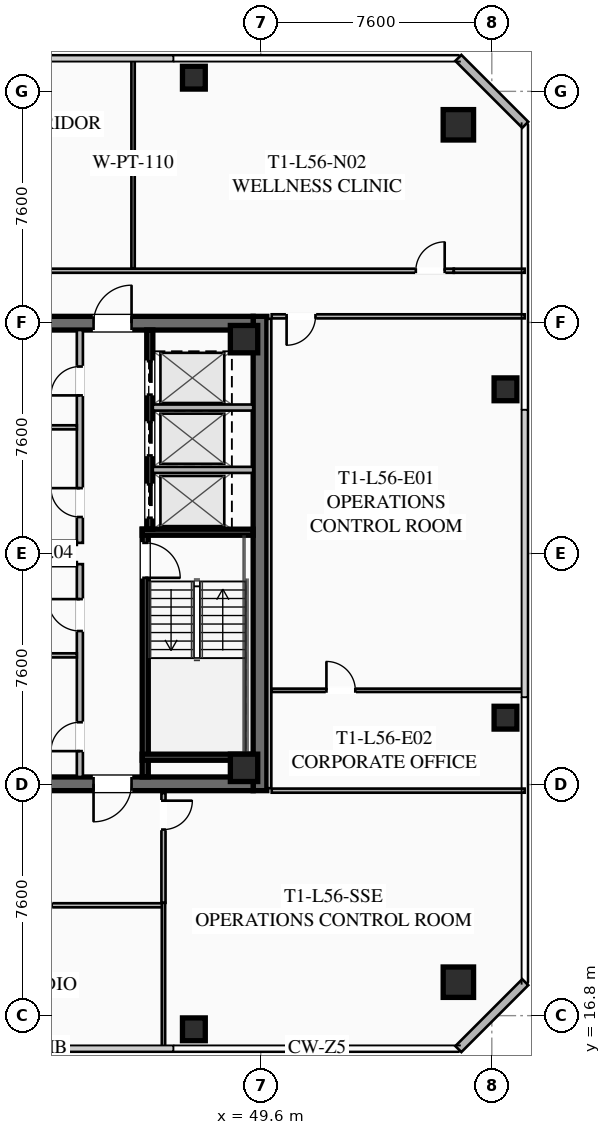
"""IFC4 building model, lengths in metres.
Left out: names, types, materials, properties, quantities, classifications, styles, units other than length and angle.
Written with IfcOpenShell. Run it as: python <this file> out.ifc"""

import sys

from ifc_helpers import new_model, si_unit, direction, frame, frame_2d, origin, origin_2d, place, context, subcontext, project, spatial, rectangle, hollow_rectangle, extrude, element, fill, save


model = new_model("IFC4")
c1 = context("Model", 3, precision=1e-05, world=origin(), true_north=direction((0.0, 1.0)))
c2 = subcontext(c1, "Body", "Model", "MODEL_VIEW")
j1 = project(units=[si_unit("LENGTHUNIT", "METRE"), si_unit("PLANEANGLEUNIT", "RADIAN")], contexts=[c1])
p1 = place(None, origin())
s1 = spatial("IfcSite", under=j1, at=p1, CompositionType="ELEMENT")
p2 = place(p1, origin())
s2 = spatial("IfcBuilding", under=s1, at=p2, CompositionType="ELEMENT")
p3 = place(p2, frame((0.0, 0.0, 207.75)))
s3 = spatial("IfcBuildingStorey", under=s2, at=p3, CompositionType="ELEMENT", Elevation=207.75)
p4 = place(p3, frame((49.575, 39.8, 0.0), z_axis=(0.0, 0.0, 1.0), x_axis=(0.0, -1.0, 0.0)))
e1 = element("IfcWall", 1, at=p4, inside=s3, PredefinedType="SHEAR", context=c2, shape_type="SweptSolid", body=[
    extrude(rectangle(XDim=15.6, YDim=0.45, at=frame_2d((7.8, 0.0))), origin(), (0.0, 0.0, 1.0), 3.55),
])
p5 = place(p3, frame((49.35, 24.425, 0.0), z_axis=(0.0, 0.0, 1.0), x_axis=(-1.0, 0.0, 0.0)))
e2 = element("IfcWall", 2, at=p5, inside=s3, PredefinedType="SHEAR", context=c2, shape_type="SweptSolid", body=[
    extrude(rectangle(XDim=14.7, YDim=0.45, at=frame_2d((7.35, 0.0))), origin(), (0.0, 0.0, 1.0), 3.55),
])
p6 = place(p5, frame((9.05, 0.0, 0.0)))
e3 = element("IfcOpeningElement", 3, at=p6, cuts=e2, PredefinedType="OPENING", context=c2, shape_type="SweptSolid", body=[
    extrude(rectangle(XDim=1.25, YDim=2.25, at=frame_2d((0.625, 1.125))), frame((0.0, 0.235, 0.0), z_axis=(0.0, -1.0, 0.0), x_axis=(1.0, 0.0, 0.0)), (0.0, 0.0, 1.0), 0.47),
])
p7 = place(p5, frame((4.0, 0.0, 0.0)))
e4 = element("IfcOpeningElement", 4, at=p7, cuts=e2, PredefinedType="OPENING", context=c2, shape_type="SweptSolid", body=[
    extrude(rectangle(XDim=1.25, YDim=2.25, at=frame_2d((0.625, 1.125))), frame((0.0, 0.235, 0.0), z_axis=(0.0, -1.0, 0.0), x_axis=(1.0, 0.0, 0.0)), (0.0, 0.0, 1.0), 0.47),
])
p8 = place(p3, frame((34.65, 39.575, 0.0), z_axis=(0.0, 0.0, 1.0), x_axis=(1.0, 0.0, 0.0)))
e5 = element("IfcWall", 5, at=p8, inside=s3, PredefinedType="SHEAR", context=c2, shape_type="SweptSolid", body=[
    extrude(rectangle(XDim=14.7, YDim=0.45, at=frame_2d((7.35, 0.0))), origin(), (0.0, 0.0, 1.0), 3.55),
])
p9 = place(p8, frame((4.4, 0.0, 0.0)))
e6 = element("IfcOpeningElement", 6, at=p9, cuts=e5, PredefinedType="OPENING", context=c2, shape_type="SweptSolid", body=[
    extrude(rectangle(XDim=1.25, YDim=2.25, at=frame_2d((0.625, 1.125))), frame((0.0, 0.235, 0.0), z_axis=(0.0, -1.0, 0.0), x_axis=(1.0, 0.0, 0.0)), (0.0, 0.0, 1.0), 0.47),
])
p10 = place(p8, frame((9.45, 0.0, 0.0)))
e7 = element("IfcOpeningElement", 7, at=p10, cuts=e5, PredefinedType="OPENING", context=c2, shape_type="SweptSolid", body=[
    extrude(rectangle(XDim=1.25, YDim=2.25, at=frame_2d((0.625, 1.125))), frame((0.0, 0.235, 0.0), z_axis=(0.0, -1.0, 0.0), x_axis=(1.0, 0.0, 0.0)), (0.0, 0.0, 1.0), 0.47),
])
for number, where, z_axis, x_axis in (
    (8, (49.05, 24.95, 0.0), (0.0, 0.0, 1.0), (1.0, 0.0, 0.0)),
    (9, (49.05, 39.05, 0.0), (0.0, 0.0, 1.0), (1.0, 0.0, 0.0)),
):
    element("IfcColumn", number, at=place(p3, frame(where, z_axis=z_axis, x_axis=x_axis)), inside=s3, PredefinedType="COLUMN", context=c2, shape_type="SweptSolid", body=[
        extrude(hollow_rectangle(XDim=0.9, YDim=0.9, WallThickness=0.04, at=origin_2d()), origin(), (0.0, 0.0, 1.0), 3.37),
    ])
for number, where, z_axis, x_axis in (
    (10, (56.1, 17.9, 0.0), (0.0, 0.0, 1.0), (1.0, 0.0, 0.0)),
    (11, (56.1, 46.1, 0.0), (0.0, 0.0, 1.0), (1.0, 0.0, 0.0)),
):
    element("IfcColumn", number, at=place(p3, frame(where, z_axis=z_axis, x_axis=x_axis)), inside=s3, PredefinedType="COLUMN", context=c2, shape_type="SweptSolid", body=[
        extrude(hollow_rectangle(XDim=1.0, YDim=1.0, WallThickness=0.04, at=origin_2d()), origin(), (0.0, 0.0, 1.0), 3.37),
    ])
for number, where, z_axis, x_axis in (
    (12, (47.4, 16.35, 0.0), (0.0, 0.0, 1.0), (1.0, 0.0, 0.0)),
    (13, (57.65, 26.6, 0.0), (0.0, 0.0, 1.0), (1.0, 0.0, 0.0)),
    (14, (57.65, 37.4, 0.0), (0.0, 0.0, 1.0), (1.0, 0.0, 0.0)),
    (15, (47.4, 47.65, 0.0), (0.0, 0.0, 1.0), (1.0, 0.0, 0.0)),
):
    element("IfcColumn", number, at=place(p3, frame(where, z_axis=z_axis, x_axis=x_axis)), inside=s3, PredefinedType="COLUMN", context=c2, shape_type="SweptSolid", body=[
        extrude(hollow_rectangle(XDim=0.75, YDim=0.75, WallThickness=0.032, at=origin_2d()), origin(), (0.0, 0.0, 1.0), 3.37),
    ])
for number, where, z_axis, x_axis in (
    (16, (56.1, 48.3, 0.0), (0.0, 0.0, 1.0), (0.707, -0.707, 0.0)),
    (17, (58.3, 17.9, 0.0), (0.0, 0.0, 1.0), (-0.707, -0.707, 0.0)),
):
    element("IfcWall", number, at=place(p3, frame(where, z_axis=z_axis, x_axis=x_axis)), inside=s3, PredefinedType="SOLIDWALL", context=c2, shape_type="SweptSolid", body=[
        extrude(rectangle(XDim=3.111, YDim=0.28, at=frame_2d((1.556, 0.0))), origin(), (0.0, 0.0, 1.0), 3.37),
    ])
p11 = place(p3, frame((45.8, 32.8, 0.0), z_axis=(0.0, 0.0, 1.0), x_axis=(0.0, -1.0, 0.0)))
e18 = element("IfcWall", 18, at=p11, inside=s3, PredefinedType="SHEAR", context=c2, shape_type="SweptSolid", body=[
    extrude(rectangle(XDim=8.15, YDim=0.2, at=frame_2d((4.075, 0.0))), origin(), (0.0, 0.0, 1.0), 3.37),
])
p12 = place(p11, frame((0.45, 0.0, 0.0)))
e19 = element("IfcOpeningElement", 19, at=p12, cuts=e18, PredefinedType="OPENING", context=c2, shape_type="SweptSolid", body=[
    extrude(rectangle(XDim=1.15, YDim=2.2, at=frame_2d((0.575, 1.1))), frame((0.0, 0.11, 0.0), z_axis=(0.0, -1.0, 0.0), x_axis=(1.0, 0.0, 0.0)), (0.0, 0.0, 1.0), 0.22),
])
for number, where, z_axis, x_axis in (
    (20, (45.7, 32.7, 0.0), (0.0, 0.0, 1.0), (1.0, 0.0, 0.0)),
    (21, (45.7, 25.3, 0.0), (0.0, 0.0, 1.0), (1.0, 0.0, 0.0)),
):
    element("IfcWall", number, at=place(p3, frame(where, z_axis=z_axis, x_axis=x_axis)), inside=s3, PredefinedType="SHEAR", context=c2, shape_type="SweptSolid", body=[
        extrude(rectangle(XDim=3.65, YDim=0.2, at=frame_2d((1.825, 0.0))), origin(), (0.0, 0.0, 1.0), 3.37),
    ])
p13 = place(p3, frame((45.95, 39.35, 0.0), z_axis=(0.0, 0.0, 1.0), x_axis=(0.0, -1.0, 0.0)))
e22 = element("IfcWall", 22, at=p13, inside=s3, PredefinedType="SHEAR", context=c2, shape_type="SweptSolid", body=[
    extrude(rectangle(XDim=6.55, YDim=0.2, at=frame_2d((3.275, 0.0))), origin(), (0.0, 0.0, 1.0), 3.37),
])
p14 = place(p13, frame((5.075, 0.0, 0.0)))
e23 = element("IfcOpeningElement", 23, at=p14, cuts=e22, PredefinedType="OPENING", context=c2, shape_type="SweptSolid", body=[
    extrude(rectangle(XDim=1.1, YDim=2.2, at=frame_2d((0.55, 1.1))), frame((0.0, 0.11, 0.0), z_axis=(0.0, -1.0, 0.0), x_axis=(1.0, 0.0, 0.0)), (0.0, 0.0, 1.0), 0.22),
])
p15 = place(p13, frame((3.025, 0.0, 0.0)))
e24 = element("IfcOpeningElement", 24, at=p15, cuts=e22, PredefinedType="OPENING", context=c2, shape_type="SweptSolid", body=[
    extrude(rectangle(XDim=1.1, YDim=2.2, at=frame_2d((0.55, 1.1))), frame((0.0, 0.11, 0.0), z_axis=(0.0, -1.0, 0.0), x_axis=(1.0, 0.0, 0.0)), (0.0, 0.0, 1.0), 0.22),
])
p16 = place(p13, frame((1.025, 0.0, 0.0)))
e25 = element("IfcOpeningElement", 25, at=p16, cuts=e22, PredefinedType="OPENING", context=c2, shape_type="SweptSolid", body=[
    extrude(rectangle(XDim=1.1, YDim=2.2, at=frame_2d((0.55, 1.1))), frame((0.0, 0.11, 0.0), z_axis=(0.0, -1.0, 0.0), x_axis=(1.0, 0.0, 0.0)), (0.0, 0.0, 1.0), 0.22),
])
for number, where, z_axis, x_axis in (
    (26, (46.05, 34.75, 0.0), (0.0, 0.0, 1.0), (1.0, 0.0, 0.0)),
    (27, (46.05, 36.8, 0.0), (0.0, 0.0, 1.0), (1.0, 0.0, 0.0)),
):
    element("IfcWall", number, at=place(p3, frame(where, z_axis=z_axis, x_axis=x_axis)), inside=s3, PredefinedType="SOLIDWALL", context=c2, shape_type="SweptSolid", body=[
        extrude(rectangle(XDim=3.3, YDim=0.2, at=frame_2d((1.65, 0.0))), origin(), (0.0, 0.0, 1.0), 3.37),
    ])
p17 = place(p3, frame((43.65, 24.65, 0.0), z_axis=(0.0, 0.0, 1.0), x_axis=(0.0, 1.0, 0.0)))
e28 = element("IfcWall", 28, at=p17, inside=s3, PredefinedType="SOLIDWALL", context=c2, shape_type="SweptSolid", body=[
    extrude(rectangle(XDim=7.0, YDim=0.2, at=frame_2d((3.5, 0.0))), origin(), (0.0, 0.0, 1.0), 2.723),
])
p18 = place(p17, frame((0.85, 0.0, 0.0)))
e29 = element("IfcOpeningElement", 29, at=p18, cuts=e28, PredefinedType="OPENING", context=c2, shape_type="SweptSolid", body=[
    extrude(rectangle(XDim=0.95, YDim=2.05, at=frame_2d((0.475, 1.025))), frame((0.0, 0.11, 0.0), z_axis=(0.0, -1.0, 0.0), x_axis=(1.0, 0.0, 0.0)), (0.0, 0.0, 1.0), 0.22),
])
p19 = place(p17, frame((4.8, 0.0, 0.0)))
e30 = element("IfcOpeningElement", 30, at=p19, cuts=e28, PredefinedType="OPENING", context=c2, shape_type="SweptSolid", body=[
    extrude(rectangle(XDim=1.05, YDim=2.2, at=frame_2d((0.525, 1.1))), frame((0.0, 0.11, 0.0), z_axis=(0.0, -1.0, 0.0), x_axis=(1.0, 0.0, 0.0)), (0.0, 0.0, 1.0), 0.22),
])
for number, where, z_axis, x_axis in (
    (31, (41.67, 31.65, 0.0), (0.0, 0.0, 1.0), (1.0, 0.0, 0.0)),
    (32, (41.67, 28.65, 0.0), (0.0, 0.0, 1.0), (1.0, 0.0, 0.0)),
):
    element("IfcWall", number, at=place(p3, frame(where, z_axis=z_axis, x_axis=x_axis)), inside=s3, PredefinedType="PARTITIONING", context=c2, shape_type="SweptSolid", body=[
        extrude(rectangle(XDim=1.88, YDim=0.135, at=frame_2d((0.94, 0.0))), origin(), (0.0, 0.0, 1.0), 2.723),
    ])
p20 = place(p3, frame((43.65, 32.35, 0.0), z_axis=(0.0, 0.0, 1.0), x_axis=(0.0, 1.0, 0.0)))
e33 = element("IfcWall", 33, at=p20, inside=s3, PredefinedType="SOLIDWALL", context=c2, shape_type="SweptSolid", body=[
    extrude(rectangle(XDim=7.0, YDim=0.2, at=frame_2d((3.5, 0.0))), origin(), (0.0, 0.0, 1.0), 2.723),
])
p21 = place(p20, frame((0.85, 0.0, 0.0)))
e34 = element("IfcOpeningElement", 34, at=p21, cuts=e33, PredefinedType="OPENING", context=c2, shape_type="SweptSolid", body=[
    extrude(rectangle(XDim=0.95, YDim=2.05, at=frame_2d((0.475, 1.025))), frame((0.0, 0.11, 0.0), z_axis=(0.0, -1.0, 0.0), x_axis=(1.0, 0.0, 0.0)), (0.0, 0.0, 1.0), 0.22),
])
p22 = place(p20, frame((4.85, 0.0, 0.0)))
e35 = element("IfcOpeningElement", 35, at=p22, cuts=e33, PredefinedType="OPENING", context=c2, shape_type="SweptSolid", body=[
    extrude(rectangle(XDim=0.95, YDim=2.05, at=frame_2d((0.475, 1.025))), frame((0.0, 0.11, 0.0), z_axis=(0.0, -1.0, 0.0), x_axis=(1.0, 0.0, 0.0)), (0.0, 0.0, 1.0), 0.22),
])
for number, where, z_axis, x_axis in (
    (36, (41.67, 32.35, 0.0), (0.0, 0.0, 1.0), (1.0, 0.0, 0.0)),
    (37, (41.67, 36.15, 0.0), (0.0, 0.0, 1.0), (1.0, 0.0, 0.0)),
):
    element("IfcWall", number, at=place(p3, frame(where, z_axis=z_axis, x_axis=x_axis)), inside=s3, PredefinedType="PARTITIONING", context=c2, shape_type="SweptSolid", body=[
        extrude(rectangle(XDim=1.88, YDim=0.135, at=frame_2d((0.94, 0.0))), origin(), (0.0, 0.0, 1.0), 2.723),
    ])
p23 = place(p3, frame((28.05, 41.3, 0.0), z_axis=(0.0, 0.0, 1.0), x_axis=(1.0, 0.0, 0.0)))
e38 = element("IfcWall", 38, at=p23, inside=s3, PredefinedType="PARTITIONING", context=c2, shape_type="SweptSolid", body=[
    extrude(rectangle(XDim=27.9, YDim=0.135, at=frame_2d((13.95, 0.0))), origin(), (0.0, 0.0, 1.0), 2.723),
])
p24 = place(p23, frame((0.3, 0.0, 0.0)))
e39 = element("IfcOpeningElement", 39, at=p24, cuts=e38, PredefinedType="OPENING", context=c2, shape_type="SweptSolid", body=[
    extrude(rectangle(XDim=0.95, YDim=2.05, at=frame_2d((0.475, 1.025))), frame((0.0, 0.077, 0.0), z_axis=(0.0, -1.0, 0.0), x_axis=(1.0, 0.0, 0.0)), (0.0, 0.0, 1.0), 0.155),
])
p25 = place(p23, frame((26.65, 0.0, 0.0)))
e40 = element("IfcOpeningElement", 40, at=p25, cuts=e38, PredefinedType="OPENING", context=c2, shape_type="SweptSolid", body=[
    extrude(rectangle(XDim=0.95, YDim=2.05, at=frame_2d((0.475, 1.025))), frame((0.0, 0.077, 0.0), z_axis=(0.0, -1.0, 0.0), x_axis=(1.0, 0.0, 0.0)), (0.0, 0.0, 1.0), 0.155),
])
p26 = place(p3, frame((55.95, 41.3, 0.0), z_axis=(0.0, 0.0, 1.0), x_axis=(1.0, 0.0, 0.0)))
e41 = element("IfcWall", 41, at=p26, inside=s3, PredefinedType="PARTITIONING", context=c2, shape_type="SweptSolid", body=[
    extrude(rectangle(XDim=2.33, YDim=0.135, at=frame_2d((1.165, 0.0))), origin(), (0.0, 0.0, 1.0), 2.723),
])
p27 = place(p3, frame((45.4, 41.38, 0.0), z_axis=(0.0, 0.0, 1.0), x_axis=(0.0, 1.0, 0.0)))
e42 = element("IfcWall", 42, at=p27, inside=s3, PredefinedType="PARTITIONING", context=c2, shape_type="SweptSolid", body=[
    extrude(rectangle(XDim=6.9, YDim=0.11, at=frame_2d((3.45, 0.0))), origin(), (0.0, 0.0, 1.0), 2.723),
])
p28 = place(p3, frame((46.4, 20.43, 0.0), z_axis=(0.0, 0.0, 1.0), x_axis=(-1.0, 0.0, 0.0)))
e43 = element("IfcWall", 43, at=p28, inside=s3, PredefinedType="PARTITIONING", context=c2, shape_type="SweptSolid", body=[
    extrude(rectangle(XDim=18.35, YDim=0.135, at=frame_2d((9.175, 0.0))), origin(), (0.0, 0.0, 1.0), 2.723),
])
p29 = place(p28, frame((17.02, 0.0, 0.0)))
e44 = element("IfcOpeningElement", 44, at=p29, cuts=e43, PredefinedType="OPENING", context=c2, shape_type="SweptSolid", body=[
    extrude(rectangle(XDim=0.95, YDim=2.05, at=frame_2d((0.475, 1.025))), frame((0.0, 0.077, 0.0), z_axis=(0.0, -1.0, 0.0), x_axis=(1.0, 0.0, 0.0)), (0.0, 0.0, 1.0), 0.155),
])
p30 = place(p28, frame((3.677, 0.0, 0.0)))
e45 = element("IfcOpeningElement", 45, at=p30, cuts=e43, PredefinedType="OPENING", context=c2, shape_type="SweptSolid", body=[
    extrude(rectangle(XDim=0.95, YDim=2.05, at=frame_2d((0.475, 1.025))), frame((0.0, 0.077, 0.0), z_axis=(0.0, -1.0, 0.0), x_axis=(1.0, 0.0, 0.0)), (0.0, 0.0, 1.0), 0.155),
])
p31 = place(p3, frame((46.4, 24.12, 0.0), z_axis=(0.0, 0.0, 1.0), x_axis=(0.0, -1.0, 0.0)))
e46 = element("IfcWall", 46, at=p31, inside=s3, PredefinedType="PARTITIONING", context=c2, shape_type="SweptSolid", body=[
    extrude(rectangle(XDim=3.61, YDim=0.135, at=frame_2d((1.805, 0.0))), origin(), (0.0, 0.0, 1.0), 2.723),
])
p32 = place(p31, frame((0.25, 0.0, 0.0)))
e47 = element("IfcOpeningElement", 47, at=p32, cuts=e46, PredefinedType="OPENING", context=c2, shape_type="SweptSolid", body=[
    extrude(rectangle(XDim=0.95, YDim=2.05, at=frame_2d((0.475, 1.025))), frame((0.0, 0.077, 0.0), z_axis=(0.0, -1.0, 0.0), x_axis=(1.0, 0.0, 0.0)), (0.0, 0.0, 1.0), 0.155),
])
p33 = place(p3, frame((46.4, 15.72, 0.0), z_axis=(0.0, 0.0, 1.0), x_axis=(0.0, 1.0, 0.0)))
e48 = element("IfcWall", 48, at=p33, inside=s3, PredefinedType="PARTITIONING", context=c2, shape_type="SweptSolid", body=[
    extrude(rectangle(XDim=4.79, YDim=0.11, at=frame_2d((2.395, 0.0))), origin(), (0.0, 0.0, 1.0), 2.723),
])
p34 = place(p3, frame((49.88, 39.72, 0.0), z_axis=(0.0, 0.0, 1.0), x_axis=(0.0, -1.0, 0.0)))
e49 = element("IfcWall", 49, at=p34, inside=s3, PredefinedType="PARTITIONING", context=c2, shape_type="SweptSolid", body=[
    extrude(rectangle(XDim=15.44, YDim=0.135, at=frame_2d((7.72, 0.0))), origin(), (0.0, 0.0, 1.0), 2.723),
])
p35 = place(p3, frame((58.28, 39.8, 0.0), z_axis=(0.0, 0.0, 1.0), x_axis=(-1.0, 0.0, 0.0)))
e50 = element("IfcWall", 50, at=p35, inside=s3, PredefinedType="PARTITIONING", context=c2, shape_type="SweptSolid", body=[
    extrude(rectangle(XDim=8.32, YDim=0.135, at=frame_2d((4.16, 0.0))), origin(), (0.0, 0.0, 1.0), 2.723),
])
p36 = place(p35, frame((6.88, 0.0, 0.0)))
e51 = element("IfcOpeningElement", 51, at=p36, cuts=e50, PredefinedType="OPENING", context=c2, shape_type="SweptSolid", body=[
    extrude(rectangle(XDim=0.95, YDim=2.05, at=frame_2d((0.475, 1.025))), frame((0.0, 0.077, 0.0), z_axis=(0.0, -1.0, 0.0), x_axis=(1.0, 0.0, 0.0)), (0.0, 0.0, 1.0), 0.155),
])
p37 = place(p3, frame((49.96, 24.2, 0.0), z_axis=(0.0, 0.0, 1.0), x_axis=(1.0, 0.0, 0.0)))
e52 = element("IfcWall", 52, at=p37, inside=s3, PredefinedType="PARTITIONING", context=c2, shape_type="SweptSolid", body=[
    extrude(rectangle(XDim=8.32, YDim=0.135, at=frame_2d((4.16, 0.0))), origin(), (0.0, 0.0, 1.0), 2.723),
])
p38 = place(p3, frame((49.96, 27.5, 0.0), z_axis=(0.0, 0.0, 1.0), x_axis=(1.0, 0.0, 0.0)))
e53 = element("IfcWall", 53, at=p38, inside=s3, PredefinedType="PARTITIONING", context=c2, shape_type="SweptSolid", body=[
    extrude(rectangle(XDim=8.32, YDim=0.11, at=frame_2d((4.16, 0.0))), origin(), (0.0, 0.0, 1.0), 2.723),
])
p39 = place(p38, frame((1.8, 0.0, 0.0)))
e54 = element("IfcOpeningElement", 54, at=p39, cuts=e53, PredefinedType="OPENING", context=c2, shape_type="SweptSolid", body=[
    extrude(rectangle(XDim=0.95, YDim=2.05, at=frame_2d((0.475, 1.025))), frame((0.0, 0.065, 0.0), z_axis=(0.0, -1.0, 0.0), x_axis=(1.0, 0.0, 0.0)), (0.0, 0.0, 1.0), 0.13),
])
p40 = place(p10, origin())
e55 = element("IfcDoor", 55, at=p40, inside=s3, OperationType="SINGLE_SWING_RIGHT", PredefinedType="DOOR", context=c2, shape_type="SweptSolid", body=[
    extrude(rectangle(XDim=1.25, YDim=2.25, at=frame_2d((0.625, 1.125))), frame((0.0, 0.025, 0.0), z_axis=(0.0, -1.0, 0.0), x_axis=(1.0, 0.0, 0.0)), (0.0, 0.0, 1.0), 0.05),
])
fill(e7, e55)
p41 = place(p7, origin())
e56 = element("IfcDoor", 56, at=p41, inside=s3, OperationType="SINGLE_SWING_RIGHT", PredefinedType="DOOR", context=c2, shape_type="SweptSolid", body=[
    extrude(rectangle(XDim=1.25, YDim=2.25, at=frame_2d((0.625, 1.125))), frame((0.0, 0.025, 0.0), z_axis=(0.0, -1.0, 0.0), x_axis=(1.0, 0.0, 0.0)), (0.0, 0.0, 1.0), 0.05),
])
fill(e4, e56)
p42 = place(p12, origin())
e57 = element("IfcDoor", 57, at=p42, inside=s3, OperationType="SINGLE_SWING_RIGHT", PredefinedType="DOOR", context=c2, shape_type="SweptSolid", body=[
    extrude(rectangle(XDim=1.15, YDim=2.2, at=frame_2d((0.575, 1.1))), frame((0.0, 0.025, 0.0), z_axis=(0.0, -1.0, 0.0), x_axis=(1.0, 0.0, 0.0)), (0.0, 0.0, 1.0), 0.05),
])
fill(e19, e57)
p43 = place(p18, origin())
e58 = element("IfcDoor", 58, at=p43, inside=s3, OperationType="SINGLE_SWING_LEFT", PredefinedType="DOOR", context=c2, shape_type="SweptSolid", body=[
    extrude(rectangle(XDim=0.95, YDim=2.05, at=frame_2d((0.475, 1.025))), frame((0.0, 0.025, 0.0), z_axis=(0.0, -1.0, 0.0), x_axis=(1.0, 0.0, 0.0)), (0.0, 0.0, 1.0), 0.05),
])
fill(e29, e58)
p44 = place(p19, origin())
e59 = element("IfcDoor", 59, at=p44, inside=s3, OperationType="SINGLE_SWING_RIGHT", PredefinedType="DOOR", context=c2, shape_type="SweptSolid", body=[
    extrude(rectangle(XDim=1.05, YDim=2.2, at=frame_2d((0.525, 1.1))), frame((0.0, 0.025, 0.0), z_axis=(0.0, -1.0, 0.0), x_axis=(1.0, 0.0, 0.0)), (0.0, 0.0, 1.0), 0.05),
])
fill(e30, e59)
p45 = place(p21, origin())
e60 = element("IfcDoor", 60, at=p45, inside=s3, OperationType="SINGLE_SWING_RIGHT", PredefinedType="DOOR", context=c2, shape_type="SweptSolid", body=[
    extrude(rectangle(XDim=0.95, YDim=2.05, at=frame_2d((0.475, 1.025))), frame((0.0, 0.025, 0.0), z_axis=(0.0, -1.0, 0.0), x_axis=(1.0, 0.0, 0.0)), (0.0, 0.0, 1.0), 0.05),
])
fill(e34, e60)
p46 = place(p22, origin())
e61 = element("IfcDoor", 61, at=p46, inside=s3, OperationType="SINGLE_SWING_LEFT", PredefinedType="DOOR", context=c2, shape_type="SweptSolid", body=[
    extrude(rectangle(XDim=0.95, YDim=2.05, at=frame_2d((0.475, 1.025))), frame((0.0, 0.025, 0.0), z_axis=(0.0, -1.0, 0.0), x_axis=(1.0, 0.0, 0.0)), (0.0, 0.0, 1.0), 0.05),
])
fill(e35, e61)
p47 = place(p25, origin())
e62 = element("IfcDoor", 62, at=p47, inside=s3, OperationType="SINGLE_SWING_RIGHT", PredefinedType="DOOR", context=c2, shape_type="SweptSolid", body=[
    extrude(rectangle(XDim=0.95, YDim=2.05, at=frame_2d((0.475, 1.025))), frame((0.0, 0.025, 0.0), z_axis=(0.0, -1.0, 0.0), x_axis=(1.0, 0.0, 0.0)), (0.0, 0.0, 1.0), 0.05),
])
fill(e40, e62)
p48 = place(p32, origin())
e63 = element("IfcDoor", 63, at=p48, inside=s3, OperationType="SINGLE_SWING_LEFT", PredefinedType="DOOR", context=c2, shape_type="SweptSolid", body=[
    extrude(rectangle(XDim=0.95, YDim=2.05, at=frame_2d((0.475, 1.025))), frame((0.0, 0.025, 0.0), z_axis=(0.0, -1.0, 0.0), x_axis=(1.0, 0.0, 0.0)), (0.0, 0.0, 1.0), 0.05),
])
fill(e47, e63)
p49 = place(p36, origin())
e64 = element("IfcDoor", 64, at=p49, inside=s3, OperationType="SINGLE_SWING_RIGHT", PredefinedType="DOOR", context=c2, shape_type="SweptSolid", body=[
    extrude(rectangle(XDim=0.95, YDim=2.05, at=frame_2d((0.475, 1.025))), frame((0.0, 0.025, 0.0), z_axis=(0.0, -1.0, 0.0), x_axis=(1.0, 0.0, 0.0)), (0.0, 0.0, 1.0), 0.05),
])
fill(e51, e64)
p50 = place(p39, origin())
e65 = element("IfcDoor", 65, at=p50, inside=s3, OperationType="SINGLE_SWING_LEFT", PredefinedType="DOOR", context=c2, shape_type="SweptSolid", body=[
    extrude(rectangle(XDim=0.95, YDim=2.05, at=frame_2d((0.475, 1.025))), frame((0.0, 0.025, 0.0), z_axis=(0.0, -1.0, 0.0), x_axis=(1.0, 0.0, 0.0)), (0.0, 0.0, 1.0), 0.05),
])
fill(e54, e65)
p51 = place(p14, origin())
e66 = element("IfcDoor", 66, at=p51, inside=s3, OperationType="SLIDING_TO_LEFT", PredefinedType="DOOR", context=c2, shape_type="SweptSolid", body=[
    extrude(rectangle(XDim=1.1, YDim=2.2, at=frame_2d((0.55, 1.1))), frame((0.0, 0.025, 0.0), z_axis=(0.0, -1.0, 0.0), x_axis=(1.0, 0.0, 0.0)), (0.0, 0.0, 1.0), 0.05),
])
fill(e23, e66)
p52 = place(p15, origin())
e67 = element("IfcDoor", 67, at=p52, inside=s3, OperationType="SLIDING_TO_LEFT", PredefinedType="DOOR", context=c2, shape_type="SweptSolid", body=[
    extrude(rectangle(XDim=1.1, YDim=2.2, at=frame_2d((0.55, 1.1))), frame((0.0, 0.025, 0.0), z_axis=(0.0, -1.0, 0.0), x_axis=(1.0, 0.0, 0.0)), (0.0, 0.0, 1.0), 0.05),
])
fill(e24, e67)
p53 = place(p16, origin())
e68 = element("IfcDoor", 68, at=p53, inside=s3, OperationType="SLIDING_TO_LEFT", PredefinedType="DOOR", context=c2, shape_type="SweptSolid", body=[
    extrude(rectangle(XDim=1.1, YDim=2.2, at=frame_2d((0.55, 1.1))), frame((0.0, 0.025, 0.0), z_axis=(0.0, -1.0, 0.0), x_axis=(1.0, 0.0, 0.0)), (0.0, 0.0, 1.0), 0.05),
])
fill(e25, e68)
save(model, sys.argv[1])
